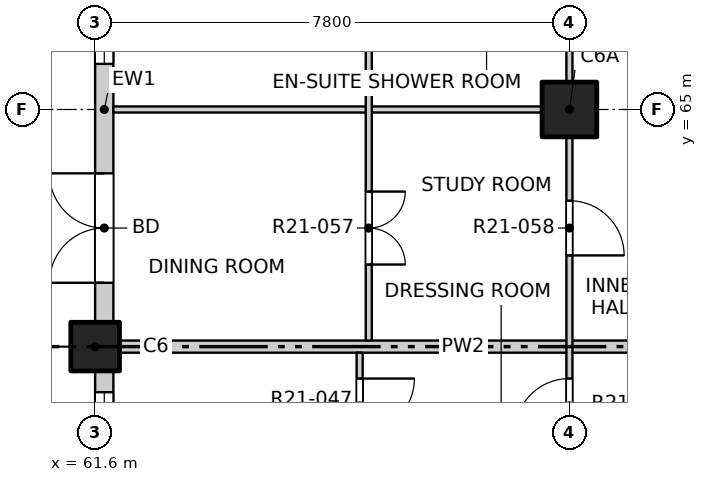
"""IFC4 building model, lengths in metres.
Left out: names, types, materials, properties, quantities, classifications, styles, units other than length and angle.
Written with IfcOpenShell. Run it as: python <this file> out.ifc"""

import sys

from ifc_helpers import new_model, si_unit, direction, frame, frame_2d, origin, origin_2d, place, context, subcontext, project, spatial, rectangle, extrude, element, fill, save


model = new_model("IFC4")
c1 = context("Model", 3, precision=1e-05, world=origin(), true_north=direction((0.0, 1.0)))
c2 = subcontext(c1, "Body", "Model", "MODEL_VIEW")
j1 = project(units=[si_unit("LENGTHUNIT", "METRE"), si_unit("PLANEANGLEUNIT", "RADIAN")], contexts=[c1])
p1 = place(None, origin())
s1 = spatial("IfcSite", under=j1, at=p1, CompositionType="ELEMENT")
p2 = place(p1, origin())
s2 = spatial("IfcBuilding", under=s1, at=p2, CompositionType="ELEMENT")
p3 = place(p2, frame((0.0, 0.0, 214.3)))
s3 = spatial("IfcBuildingStorey", under=s2, at=p3, CompositionType="ELEMENT", Elevation=214.3)
p4 = place(p3, frame((61.6, 61.1, -0.25), z_axis=(0.0, 0.0, 1.0), x_axis=(1.0, 0.0, 0.0)))
e1 = element("IfcColumn", 1, at=p4, inside=s3, PredefinedType="COLUMN", context=c2, shape_type="SweptSolid", body=[
    extrude(rectangle(XDim=0.8, YDim=0.8, at=origin_2d()), origin(), (0.0, 0.0, 1.0), 3.4),
])
p5 = place(p3, frame((69.4, 65.0, -0.25), z_axis=(0.0, 0.0, 1.0), x_axis=(1.0, 0.0, 0.0)))
e2 = element("IfcColumn", 2, at=p5, inside=s3, PredefinedType="COLUMN", context=c2, shape_type="SweptSolid", body=[
    extrude(rectangle(XDim=0.9, YDim=0.9, at=origin_2d()), origin(), (0.0, 0.0, 1.0), 3.4),
])
p6 = place(p3, frame((61.75, 53.7, 0.0), z_axis=(0.0, 0.0, 1.0), x_axis=(0.0, 1.0, 0.0)))
e3 = element("IfcWall", 3, at=p6, inside=s3, PredefinedType="SOLIDWALL", context=c2, shape_type="SweptSolid", body=[
    extrude(rectangle(XDim=7.0, YDim=0.3, at=frame_2d((3.5, 0.0))), origin(), (0.0, 0.0, 1.0), 2.7),
])
p7 = place(p6, frame((0.65, 0.0, 0.0)))
e4 = element("IfcOpeningElement", 4, at=p7, cuts=e3, PredefinedType="OPENING", context=c2, shape_type="SweptSolid", body=[
    extrude(rectangle(XDim=1.8, YDim=2.4, at=frame_2d((0.9, 1.2))), frame((0.0, 0.16, 0.0), z_axis=(0.0, -1.0, 0.0), x_axis=(1.0, 0.0, 0.0)), (0.0, 0.0, 1.0), 0.32),
])
p8 = place(p6, frame((4.25, 0.0, 0.9)))
e5 = element("IfcOpeningElement", 5, at=p8, cuts=e3, PredefinedType="OPENING", context=c2, shape_type="SweptSolid", body=[
    extrude(rectangle(XDim=2.4, YDim=1.8, at=frame_2d((1.2, 0.9))), frame((0.0, 0.16, 0.0), z_axis=(0.0, -1.0, 0.0), x_axis=(1.0, 0.0, 0.0)), (0.0, 0.0, 1.0), 0.32),
])
p9 = place(p3, frame((61.75, 61.5, 0.0), z_axis=(0.0, 0.0, 1.0), x_axis=(0.0, 1.0, 0.0)))
e6 = element("IfcWall", 6, at=p9, inside=s3, PredefinedType="SOLIDWALL", context=c2, shape_type="SweptSolid", body=[
    extrude(rectangle(XDim=7.0, YDim=0.3, at=frame_2d((3.5, 0.0))), origin(), (0.0, 0.0, 1.0), 2.7),
])
p10 = place(p9, frame((0.65, 0.0, 0.0)))
e7 = element("IfcOpeningElement", 7, at=p10, cuts=e6, PredefinedType="OPENING", context=c2, shape_type="SweptSolid", body=[
    extrude(rectangle(XDim=1.8, YDim=2.4, at=frame_2d((0.9, 1.2))), frame((0.0, 0.16, 0.0), z_axis=(0.0, -1.0, 0.0), x_axis=(1.0, 0.0, 0.0)), (0.0, 0.0, 1.0), 0.32),
])
p11 = place(p9, frame((4.25, 0.0, 0.9)))
e8 = element("IfcOpeningElement", 8, at=p11, cuts=e6, PredefinedType="OPENING", context=c2, shape_type="SweptSolid", body=[
    extrude(rectangle(XDim=2.4, YDim=1.8, at=frame_2d((1.2, 0.9))), frame((0.0, 0.16, 0.0), z_axis=(0.0, -1.0, 0.0), x_axis=(1.0, 0.0, 0.0)), (0.0, 0.0, 1.0), 0.32),
])
p12 = place(p3, frame((61.9, 61.1, 0.0), z_axis=(0.0, 0.0, 1.0), x_axis=(1.0, 0.0, 0.0)))
e9 = element("IfcWall", 9, at=p12, inside=s3, PredefinedType="PARTITIONING", context=c2, shape_type="SweptSolid", body=[
    extrude(rectangle(XDim=11.5, YDim=0.2, at=frame_2d((5.75, 0.0))), origin(), (0.0, 0.0, 1.0), 2.55),
])
p13 = place(p3, frame((61.9, 65.0, 0.0), z_axis=(0.0, 0.0, 1.0), x_axis=(1.0, 0.0, 0.0)))
e10 = element("IfcWall", 10, at=p13, inside=s3, PredefinedType="PARTITIONING", context=c2, shape_type="SweptSolid", body=[
    extrude(rectangle(XDim=7.55, YDim=0.1, at=frame_2d((3.775, 0.0))), origin(), (0.0, 0.0, 1.0), 3.15),
])
p14 = place(p3, frame((65.95, 41.9, 0.0), z_axis=(0.0, 0.0, 1.0), x_axis=(0.0, 1.0, 0.0)))
e11 = element("IfcWall", 11, at=p14, inside=s3, PredefinedType="PARTITIONING", context=c2, shape_type="SweptSolid", body=[
    extrude(rectangle(XDim=19.1, YDim=0.1, at=frame_2d((9.55, 0.0))), origin(), (0.0, 0.0, 1.0), 3.15),
])
p15 = place(p14, frame((1.05, 0.0, 0.0)))
e12 = element("IfcOpeningElement", 12, at=p15, cuts=e11, PredefinedType="OPENING", context=c2, shape_type="SweptSolid", body=[
    extrude(rectangle(XDim=1.2, YDim=2.1, at=frame_2d((0.6, 1.05))), frame((0.0, 0.06, 0.0), z_axis=(0.0, -1.0, 0.0), x_axis=(1.0, 0.0, 0.0)), (0.0, 0.0, 1.0), 0.12),
])
p16 = place(p14, frame((4.125, 0.0, 0.0)))
e13 = element("IfcOpeningElement", 13, at=p16, cuts=e11, PredefinedType="OPENING", context=c2, shape_type="SweptSolid", body=[
    extrude(rectangle(XDim=0.9, YDim=2.1, at=frame_2d((0.45, 1.05))), frame((0.0, 0.06, 0.0), z_axis=(0.0, -1.0, 0.0), x_axis=(1.0, 0.0, 0.0)), (0.0, 0.0, 1.0), 0.12),
])
p17 = place(p14, frame((6.075, 0.0, 0.0)))
e14 = element("IfcOpeningElement", 14, at=p17, cuts=e11, PredefinedType="OPENING", context=c2, shape_type="SweptSolid", body=[
    extrude(rectangle(XDim=0.9, YDim=2.1, at=frame_2d((0.45, 1.05))), frame((0.0, 0.06, 0.0), z_axis=(0.0, -1.0, 0.0), x_axis=(1.0, 0.0, 0.0)), (0.0, 0.0, 1.0), 0.12),
])
p18 = place(p14, frame((8.85, 0.0, 0.0)))
e15 = element("IfcOpeningElement", 15, at=p18, cuts=e11, PredefinedType="OPENING", context=c2, shape_type="SweptSolid", body=[
    extrude(rectangle(XDim=1.2, YDim=2.1, at=frame_2d((0.6, 1.05))), frame((0.0, 0.06, 0.0), z_axis=(0.0, -1.0, 0.0), x_axis=(1.0, 0.0, 0.0)), (0.0, 0.0, 1.0), 0.12),
])
p19 = place(p14, frame((12.75, 0.0, 0.0)))
e16 = element("IfcOpeningElement", 16, at=p19, cuts=e11, PredefinedType="OPENING", context=c2, shape_type="SweptSolid", body=[
    extrude(rectangle(XDim=1.2, YDim=2.1, at=frame_2d((0.6, 1.05))), frame((0.0, 0.06, 0.0), z_axis=(0.0, -1.0, 0.0), x_axis=(1.0, 0.0, 0.0)), (0.0, 0.0, 1.0), 0.12),
])
p20 = place(p14, frame((15.825, 0.0, 0.0)))
e17 = element("IfcOpeningElement", 17, at=p20, cuts=e11, PredefinedType="OPENING", context=c2, shape_type="SweptSolid", body=[
    extrude(rectangle(XDim=0.9, YDim=2.1, at=frame_2d((0.45, 1.05))), frame((0.0, 0.06, 0.0), z_axis=(0.0, -1.0, 0.0), x_axis=(1.0, 0.0, 0.0)), (0.0, 0.0, 1.0), 0.12),
])
p21 = place(p14, frame((17.775, 0.0, 0.0)))
e18 = element("IfcOpeningElement", 18, at=p21, cuts=e11, PredefinedType="OPENING", context=c2, shape_type="SweptSolid", body=[
    extrude(rectangle(XDim=0.9, YDim=2.1, at=frame_2d((0.45, 1.05))), frame((0.0, 0.06, 0.0), z_axis=(0.0, -1.0, 0.0), x_axis=(1.0, 0.0, 0.0)), (0.0, 0.0, 1.0), 0.12),
])
p22 = place(p3, frame((66.1, 61.2, 0.0), z_axis=(0.0, 0.0, 1.0), x_axis=(0.0, 1.0, 0.0)))
e19 = element("IfcWall", 19, at=p22, inside=s3, PredefinedType="PARTITIONING", context=c2, shape_type="SweptSolid", body=[
    extrude(rectangle(XDim=26.9, YDim=0.1, at=frame_2d((13.45, 0.0))), origin(), (0.0, 0.0, 1.0), 3.15),
])
p23 = place(p22, frame((1.25, 0.0, 0.0)))
e20 = element("IfcOpeningElement", 20, at=p23, cuts=e19, PredefinedType="OPENING", context=c2, shape_type="SweptSolid", body=[
    extrude(rectangle(XDim=1.2, YDim=2.1, at=frame_2d((0.6, 1.05))), frame((0.0, 0.06, 0.0), z_axis=(0.0, -1.0, 0.0), x_axis=(1.0, 0.0, 0.0)), (0.0, 0.0, 1.0), 0.12),
])
p24 = place(p22, frame((5.15, 0.0, 0.0)))
e21 = element("IfcOpeningElement", 21, at=p24, cuts=e19, PredefinedType="OPENING", context=c2, shape_type="SweptSolid", body=[
    extrude(rectangle(XDim=1.2, YDim=2.1, at=frame_2d((0.6, 1.05))), frame((0.0, 0.06, 0.0), z_axis=(0.0, -1.0, 0.0), x_axis=(1.0, 0.0, 0.0)), (0.0, 0.0, 1.0), 0.12),
])
p25 = place(p22, frame((8.225, 0.0, 0.0)))
e22 = element("IfcOpeningElement", 22, at=p25, cuts=e19, PredefinedType="OPENING", context=c2, shape_type="SweptSolid", body=[
    extrude(rectangle(XDim=0.9, YDim=2.1, at=frame_2d((0.45, 1.05))), frame((0.0, 0.06, 0.0), z_axis=(0.0, -1.0, 0.0), x_axis=(1.0, 0.0, 0.0)), (0.0, 0.0, 1.0), 0.12),
])
p26 = place(p22, frame((10.175, 0.0, 0.0)))
e23 = element("IfcOpeningElement", 23, at=p26, cuts=e19, PredefinedType="OPENING", context=c2, shape_type="SweptSolid", body=[
    extrude(rectangle(XDim=0.9, YDim=2.1, at=frame_2d((0.45, 1.05))), frame((0.0, 0.06, 0.0), z_axis=(0.0, -1.0, 0.0), x_axis=(1.0, 0.0, 0.0)), (0.0, 0.0, 1.0), 0.12),
])
p27 = place(p22, frame((12.125, 0.0, 0.0)))
e24 = element("IfcOpeningElement", 24, at=p27, cuts=e19, PredefinedType="OPENING", context=c2, shape_type="SweptSolid", body=[
    extrude(rectangle(XDim=0.9, YDim=2.1, at=frame_2d((0.45, 1.05))), frame((0.0, 0.06, 0.0), z_axis=(0.0, -1.0, 0.0), x_axis=(1.0, 0.0, 0.0)), (0.0, 0.0, 1.0), 0.12),
])
p28 = place(p22, frame((14.075, 0.0, 0.0)))
e25 = element("IfcOpeningElement", 25, at=p28, cuts=e19, PredefinedType="OPENING", context=c2, shape_type="SweptSolid", body=[
    extrude(rectangle(XDim=0.9, YDim=2.1, at=frame_2d((0.45, 1.05))), frame((0.0, 0.06, 0.0), z_axis=(0.0, -1.0, 0.0), x_axis=(1.0, 0.0, 0.0)), (0.0, 0.0, 1.0), 0.12),
])
p29 = place(p22, frame((16.85, 0.0, 0.0)))
e26 = element("IfcOpeningElement", 26, at=p29, cuts=e19, PredefinedType="OPENING", context=c2, shape_type="SweptSolid", body=[
    extrude(rectangle(XDim=1.2, YDim=2.1, at=frame_2d((0.6, 1.05))), frame((0.0, 0.06, 0.0), z_axis=(0.0, -1.0, 0.0), x_axis=(1.0, 0.0, 0.0)), (0.0, 0.0, 1.0), 0.12),
])
p30 = place(p22, frame((19.925, 0.0, 0.0)))
e27 = element("IfcOpeningElement", 27, at=p30, cuts=e19, PredefinedType="OPENING", context=c2, shape_type="SweptSolid", body=[
    extrude(rectangle(XDim=0.9, YDim=2.1, at=frame_2d((0.45, 1.05))), frame((0.0, 0.06, 0.0), z_axis=(0.0, -1.0, 0.0), x_axis=(1.0, 0.0, 0.0)), (0.0, 0.0, 1.0), 0.12),
])
p31 = place(p22, frame((21.875, 0.0, 0.0)))
e28 = element("IfcOpeningElement", 28, at=p31, cuts=e19, PredefinedType="OPENING", context=c2, shape_type="SweptSolid", body=[
    extrude(rectangle(XDim=0.9, YDim=2.1, at=frame_2d((0.45, 1.05))), frame((0.0, 0.06, 0.0), z_axis=(0.0, -1.0, 0.0), x_axis=(1.0, 0.0, 0.0)), (0.0, 0.0, 1.0), 0.12),
])
p32 = place(p22, frame((24.65, 0.0, 0.0)))
e29 = element("IfcOpeningElement", 29, at=p32, cuts=e19, PredefinedType="OPENING", context=c2, shape_type="SweptSolid", body=[
    extrude(rectangle(XDim=1.2, YDim=2.1, at=frame_2d((0.6, 1.05))), frame((0.0, 0.06, 0.0), z_axis=(0.0, -1.0, 0.0), x_axis=(1.0, 0.0, 0.0)), (0.0, 0.0, 1.0), 0.12),
])
p33 = place(p3, frame((69.4, 41.9, 0.0), z_axis=(0.0, 0.0, 1.0), x_axis=(0.0, 1.0, 0.0)))
e30 = element("IfcWall", 30, at=p33, inside=s3, PredefinedType="PARTITIONING", context=c2, shape_type="SweptSolid", body=[
    extrude(rectangle(XDim=46.2, YDim=0.1, at=frame_2d((23.1, 0.0))), origin(), (0.0, 0.0, 1.0), 3.15),
])
p34 = place(p33, frame((1.2, 0.0, 0.0)))
e31 = element("IfcOpeningElement", 31, at=p34, cuts=e30, PredefinedType="OPENING", context=c2, shape_type="SweptSolid", body=[
    extrude(rectangle(XDim=0.9, YDim=2.1, at=frame_2d((0.45, 1.05))), frame((0.0, 0.06, 0.0), z_axis=(0.0, -1.0, 0.0), x_axis=(1.0, 0.0, 0.0)), (0.0, 0.0, 1.0), 0.12),
])
p35 = place(p33, frame((6.025, 0.0, 0.0)))
e32 = element("IfcOpeningElement", 32, at=p35, cuts=e30, PredefinedType="OPENING", context=c2, shape_type="SweptSolid", body=[
    extrude(rectangle(XDim=0.9, YDim=2.1, at=frame_2d((0.45, 1.05))), frame((0.0, 0.06, 0.0), z_axis=(0.0, -1.0, 0.0), x_axis=(1.0, 0.0, 0.0)), (0.0, 0.0, 1.0), 0.12),
])
p36 = place(p33, frame((9.0, 0.0, 0.0)))
e33 = element("IfcOpeningElement", 33, at=p36, cuts=e30, PredefinedType="OPENING", context=c2, shape_type="SweptSolid", body=[
    extrude(rectangle(XDim=0.9, YDim=2.1, at=frame_2d((0.45, 1.05))), frame((0.0, 0.06, 0.0), z_axis=(0.0, -1.0, 0.0), x_axis=(1.0, 0.0, 0.0)), (0.0, 0.0, 1.0), 0.12),
])
p37 = place(p33, frame((12.9, 0.0, 0.0)))
e34 = element("IfcOpeningElement", 34, at=p37, cuts=e30, PredefinedType="OPENING", context=c2, shape_type="SweptSolid", body=[
    extrude(rectangle(XDim=0.9, YDim=2.1, at=frame_2d((0.45, 1.05))), frame((0.0, 0.06, 0.0), z_axis=(0.0, -1.0, 0.0), x_axis=(1.0, 0.0, 0.0)), (0.0, 0.0, 1.0), 0.12),
])
p38 = place(p33, frame((17.775, 0.0, 0.0)))
e35 = element("IfcOpeningElement", 35, at=p38, cuts=e30, PredefinedType="OPENING", context=c2, shape_type="SweptSolid", body=[
    extrude(rectangle(XDim=0.9, YDim=2.1, at=frame_2d((0.45, 1.05))), frame((0.0, 0.06, 0.0), z_axis=(0.0, -1.0, 0.0), x_axis=(1.0, 0.0, 0.0)), (0.0, 0.0, 1.0), 0.12),
])
p39 = place(p33, frame((20.7, 0.0, 0.0)))
e36 = element("IfcOpeningElement", 36, at=p39, cuts=e30, PredefinedType="OPENING", context=c2, shape_type="SweptSolid", body=[
    extrude(rectangle(XDim=0.9, YDim=2.1, at=frame_2d((0.45, 1.05))), frame((0.0, 0.06, 0.0), z_axis=(0.0, -1.0, 0.0), x_axis=(1.0, 0.0, 0.0)), (0.0, 0.0, 1.0), 0.12),
])
p40 = place(p33, frame((24.6, 0.0, 0.0)))
e37 = element("IfcOpeningElement", 37, at=p40, cuts=e30, PredefinedType="OPENING", context=c2, shape_type="SweptSolid", body=[
    extrude(rectangle(XDim=0.9, YDim=2.1, at=frame_2d((0.45, 1.05))), frame((0.0, 0.06, 0.0), z_axis=(0.0, -1.0, 0.0), x_axis=(1.0, 0.0, 0.0)), (0.0, 0.0, 1.0), 0.12),
])
p41 = place(p33, frame((29.425, 0.0, 0.0)))
e38 = element("IfcOpeningElement", 38, at=p41, cuts=e30, PredefinedType="OPENING", context=c2, shape_type="SweptSolid", body=[
    extrude(rectangle(XDim=0.9, YDim=2.1, at=frame_2d((0.45, 1.05))), frame((0.0, 0.06, 0.0), z_axis=(0.0, -1.0, 0.0), x_axis=(1.0, 0.0, 0.0)), (0.0, 0.0, 1.0), 0.12),
])
p42 = place(p33, frame((33.375, 0.0, 0.0)))
e39 = element("IfcOpeningElement", 39, at=p42, cuts=e30, PredefinedType="OPENING", context=c2, shape_type="SweptSolid", body=[
    extrude(rectangle(XDim=0.9, YDim=2.1, at=frame_2d((0.45, 1.05))), frame((0.0, 0.06, 0.0), z_axis=(0.0, -1.0, 0.0), x_axis=(1.0, 0.0, 0.0)), (0.0, 0.0, 1.0), 0.12),
])
p43 = place(p33, frame((36.3, 0.0, 0.0)))
e40 = element("IfcOpeningElement", 40, at=p43, cuts=e30, PredefinedType="OPENING", context=c2, shape_type="SweptSolid", body=[
    extrude(rectangle(XDim=0.9, YDim=2.1, at=frame_2d((0.45, 1.05))), frame((0.0, 0.06, 0.0), z_axis=(0.0, -1.0, 0.0), x_axis=(1.0, 0.0, 0.0)), (0.0, 0.0, 1.0), 0.12),
])
p44 = place(p33, frame((41.175, 0.0, 0.0)))
e41 = element("IfcOpeningElement", 41, at=p44, cuts=e30, PredefinedType="OPENING", context=c2, shape_type="SweptSolid", body=[
    extrude(rectangle(XDim=0.9, YDim=2.1, at=frame_2d((0.45, 1.05))), frame((0.0, 0.06, 0.0), z_axis=(0.0, -1.0, 0.0), x_axis=(1.0, 0.0, 0.0)), (0.0, 0.0, 1.0), 0.12),
])
p45 = place(p33, frame((44.1, 0.0, 0.0)))
e42 = element("IfcOpeningElement", 42, at=p45, cuts=e30, PredefinedType="OPENING", context=c2, shape_type="SweptSolid", body=[
    extrude(rectangle(XDim=0.9, YDim=2.1, at=frame_2d((0.45, 1.05))), frame((0.0, 0.06, 0.0), z_axis=(0.0, -1.0, 0.0), x_axis=(1.0, 0.0, 0.0)), (0.0, 0.0, 1.0), 0.12),
])
p46 = place(p8, origin())
e43 = element("IfcWindow", 43, at=p46, inside=s3, PartitioningType="DOUBLE_PANEL_VERTICAL", PredefinedType="WINDOW", context=c2, shape_type="SweptSolid", body=[
    extrude(rectangle(XDim=2.4, YDim=1.8, at=frame_2d((1.2, 0.9))), frame((0.0, 0.03, 0.0), z_axis=(0.0, -1.0, 0.0), x_axis=(1.0, 0.0, 0.0)), (0.0, 0.0, 1.0), 0.06),
])
fill(e5, e43)
p47 = place(p10, origin())
e44 = element("IfcDoor", 44, at=p47, inside=s3, OperationType="DOUBLE_DOOR_SINGLE_SWING", PredefinedType="DOOR", context=c2, shape_type="SweptSolid", body=[
    extrude(rectangle(XDim=1.8, YDim=2.4, at=frame_2d((0.9, 1.2))), frame((0.0, 0.025, 0.0), z_axis=(0.0, -1.0, 0.0), x_axis=(1.0, 0.0, 0.0)), (0.0, 0.0, 1.0), 0.05),
])
fill(e7, e44)
p48 = place(p11, origin())
e45 = element("IfcWindow", 45, at=p48, inside=s3, PartitioningType="DOUBLE_PANEL_VERTICAL", PredefinedType="WINDOW", context=c2, shape_type="SweptSolid", body=[
    extrude(rectangle(XDim=2.4, YDim=1.8, at=frame_2d((1.2, 0.9))), frame((0.0, 0.03, 0.0), z_axis=(0.0, -1.0, 0.0), x_axis=(1.0, 0.0, 0.0)), (0.0, 0.0, 1.0), 0.06),
])
fill(e8, e45)
p49 = place(p21, origin())
e46 = element("IfcDoor", 46, at=p49, inside=s3, OperationType="SINGLE_SWING_LEFT", PredefinedType="DOOR", context=c2, shape_type="SweptSolid", body=[
    extrude(rectangle(XDim=0.9, YDim=2.1, at=frame_2d((0.45, 1.05))), frame((0.0, 0.025, 0.0), z_axis=(0.0, -1.0, 0.0), x_axis=(1.0, 0.0, 0.0)), (0.0, 0.0, 1.0), 0.05),
])
fill(e18, e46)
p50 = place(p38, origin())
e47 = element("IfcDoor", 47, at=p50, inside=s3, OperationType="SINGLE_SWING_LEFT", PredefinedType="DOOR", context=c2, shape_type="SweptSolid", body=[
    extrude(rectangle(XDim=0.9, YDim=2.1, at=frame_2d((0.45, 1.05))), frame((0.0, 0.025, 0.0), z_axis=(0.0, -1.0, 0.0), x_axis=(1.0, 0.0, 0.0)), (0.0, 0.0, 1.0), 0.05),
])
fill(e35, e47)
p51 = place(p23, origin())
e48 = element("IfcDoor", 48, at=p51, inside=s3, OperationType="DOUBLE_DOOR_SINGLE_SWING", PredefinedType="DOOR", context=c2, shape_type="SweptSolid", body=[
    extrude(rectangle(XDim=1.2, YDim=2.1, at=frame_2d((0.6, 1.05))), frame((0.0, 0.025, 0.0), z_axis=(0.0, -1.0, 0.0), x_axis=(1.0, 0.0, 0.0)), (0.0, 0.0, 1.0), 0.05),
])
fill(e20, e48)
p52 = place(p39, origin())
e49 = element("IfcDoor", 49, at=p52, inside=s3, OperationType="SINGLE_SWING_RIGHT", PredefinedType="DOOR", context=c2, shape_type="SweptSolid", body=[
    extrude(rectangle(XDim=0.9, YDim=2.1, at=frame_2d((0.45, 1.05))), frame((0.0, 0.025, 0.0), z_axis=(0.0, -1.0, 0.0), x_axis=(1.0, 0.0, 0.0)), (0.0, 0.0, 1.0), 0.05),
])
fill(e36, e49)
save(model, sys.argv[1])
